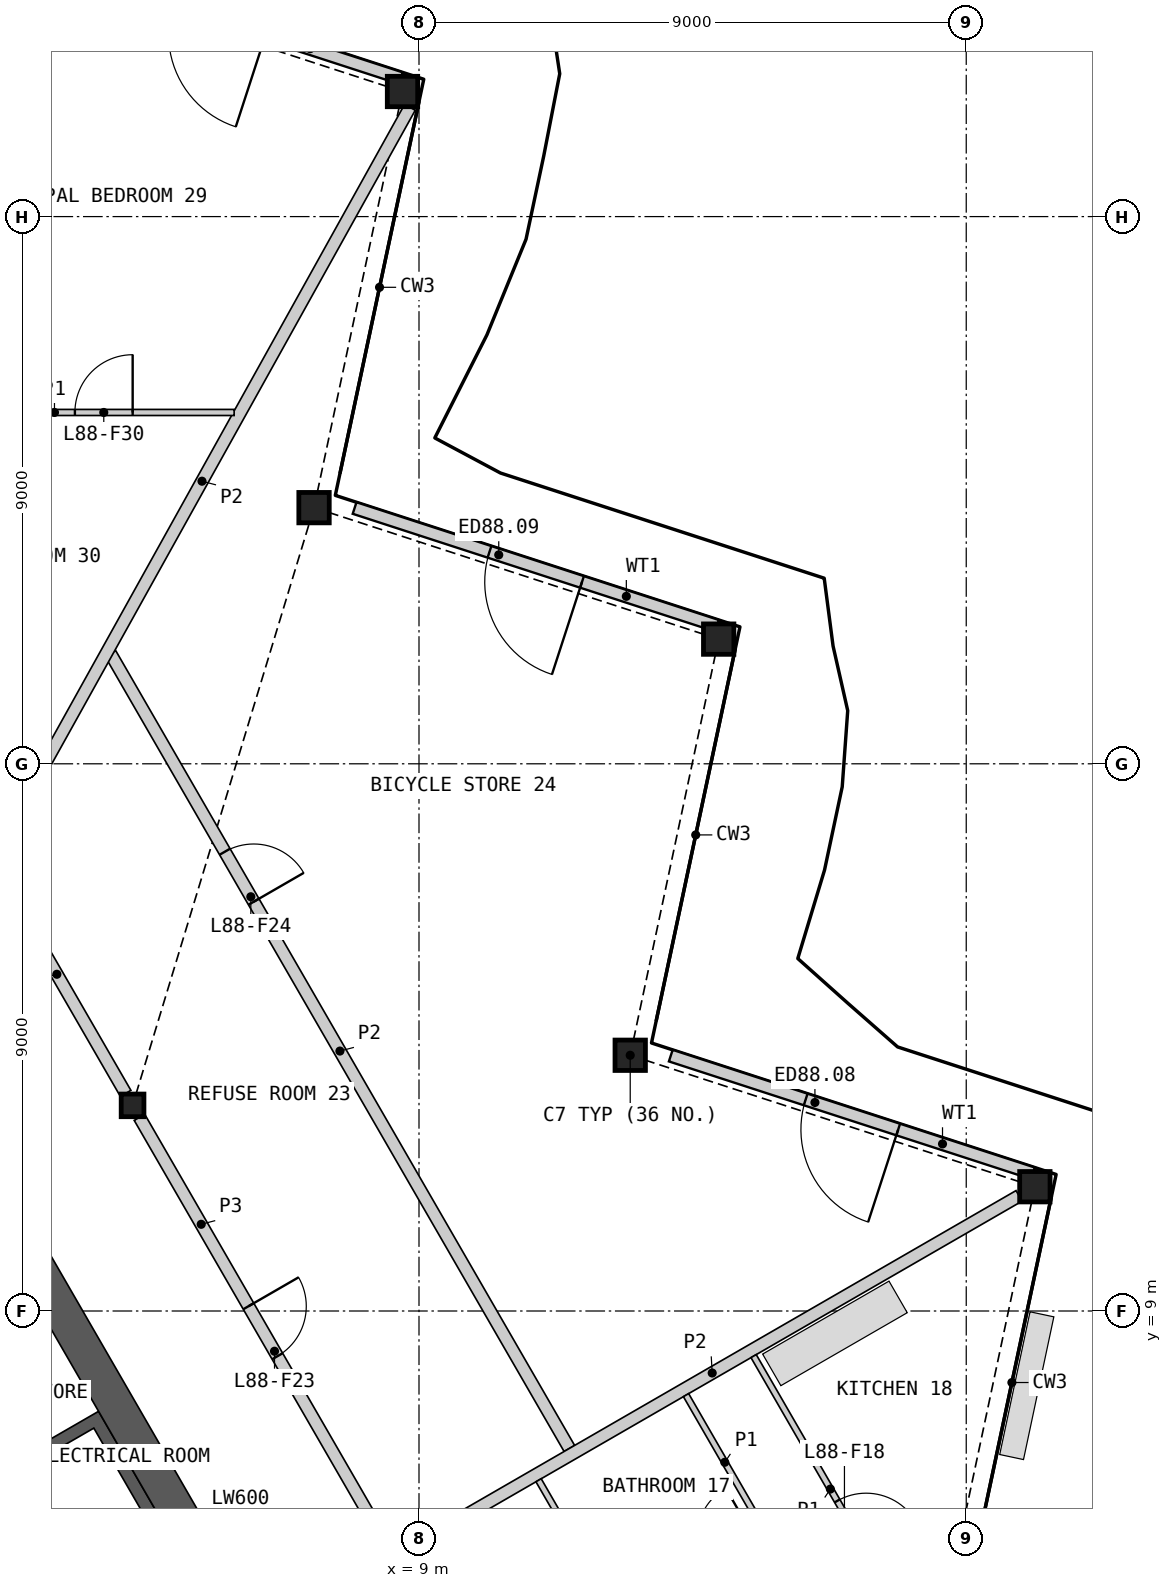
"""IFC4 building model, lengths in metres.
Left out: names, types, materials, properties, quantities, classifications, styles, units other than length and angle.
Written with IfcOpenShell. Run it as: python <this file> out.ifc"""

import sys

from ifc_helpers import new_model, si_unit, direction, frame, frame_2d, origin, origin_2d, place, context, subcontext, project, spatial, polyline, rectangle, hollow_rectangle, i_section, outline, extrude, element, fill, save


model = new_model("IFC4")
c1 = context("Model", 3, precision=1e-05, world=origin(), true_north=direction((0.0, 1.0)))
c2 = subcontext(c1, "Body", "Model", "MODEL_VIEW")
j1 = project(units=[si_unit("LENGTHUNIT", "METRE"), si_unit("PLANEANGLEUNIT", "RADIAN")], contexts=[c1])
p1 = place(None, origin())
s1 = spatial("IfcSite", under=j1, at=p1, CompositionType="ELEMENT")
p2 = place(p1, origin())
s2 = spatial("IfcBuilding", under=s1, at=p2, CompositionType="ELEMENT")
p3 = place(p2, frame((0.0, 0.0, 388.2)))
s3 = spatial("IfcBuildingStorey", under=s2, at=p3, CompositionType="ELEMENT", Elevation=388.2)
for number, where, z_axis, x_axis in (
    (1, (19.129, 11.044, 0.0), (0.0, 0.0, 1.0), (1.0, 0.0, 0.0)),
    (2, (12.474, 13.206, 0.0), (0.0, 0.0, 1.0), (1.0, 0.0, 0.0)),
    (3, (13.929, 20.051, 0.0), (0.0, 0.0, 1.0), (1.0, 0.0, 0.0)),
    (4, (7.274, 22.213, 0.0), (0.0, 0.0, 1.0), (1.0, 0.0, 0.0)),
    (5, (8.729, 29.057, 0.0), (0.0, 0.0, 1.0), (1.0, 0.0, 0.0)),
):
    element("IfcColumn", number, at=place(p3, frame(where, z_axis=z_axis, x_axis=x_axis)), inside=s3, PredefinedType="COLUMN", context=c2, shape_type="SweptSolid", body=[
        extrude(hollow_rectangle(XDim=0.5, YDim=0.5, WallThickness=0.03, at=origin_2d()), origin(), (0.0, 0.0, 1.0), 3.4),
    ])
p4 = place(p3, frame((4.289, 12.382, 0.0), z_axis=(0.0, 0.0, 1.0), x_axis=(1.0, 0.0, 0.0)))
e6 = element("IfcColumn", 6, at=p4, inside=s3, PredefinedType="COLUMN", context=c2, shape_type="SweptSolid", body=[
    extrude(i_section(OverallWidth=0.374, OverallDepth=0.372, WebThickness=0.016, FlangeThickness=0.026, at=origin_2d()), origin(), (0.0, 0.0, 1.0), 3.4),
])
p5 = place(p3, frame((19.099, 11.264, 0.0), z_axis=(0.0, 0.0, 1.0), x_axis=(-0.951056402988, 0.3090173431, 0.0)))
e7 = element("IfcWall", 7, at=p5, inside=s3, PredefinedType="SOLIDWALL", context=c2, shape_type="SweptSolid", body=[
    extrude(rectangle(XDim=6.265, YDim=0.2, at=frame_2d((3.133, 0.0))), origin(), (0.0, 0.0, 1.0), 2.634),
])
p6 = place(p5, frame((2.333, 0.0, 0.0)))
e8 = element("IfcOpeningElement", 8, at=p6, cuts=e7, PredefinedType="OPENING", context=c2, shape_type="SweptSolid", body=[
    extrude(rectangle(XDim=1.6, YDim=2.25, at=frame_2d((0.8, 1.125))), frame((0.0, 0.11, 0.0), z_axis=(0.0, -1.0, 0.0), x_axis=(1.0, 0.0, 0.0)), (0.0, 0.0, 1.0), 0.22),
])
p7 = place(p3, frame((13.899, 20.271, 0.0), z_axis=(0.0, 0.0, 1.0), x_axis=(-0.951056402988, 0.3090173431, 0.0)))
e9 = element("IfcWall", 9, at=p7, inside=s3, PredefinedType="SOLIDWALL", context=c2, shape_type="SweptSolid", body=[
    extrude(rectangle(XDim=6.265, YDim=0.2, at=frame_2d((3.133, 0.0))), origin(), (0.0, 0.0, 1.0), 2.634),
])
p8 = place(p7, frame((2.333, 0.0, 0.0)))
e10 = element("IfcOpeningElement", 10, at=p8, cuts=e9, PredefinedType="OPENING", context=c2, shape_type="SweptSolid", body=[
    extrude(rectangle(XDim=1.6, YDim=2.25, at=frame_2d((0.8, 1.125))), frame((0.0, 0.11, 0.0), z_axis=(0.0, -1.0, 0.0), x_axis=(1.0, 0.0, 0.0)), (0.0, 0.0, 1.0), 0.22),
])
p9 = place(p3, frame((8.699, 29.277, 0.0), z_axis=(0.0, 0.0, 1.0), x_axis=(-0.951048671744, 0.309041136379, 0.0)))
e11 = element("IfcWall", 11, at=p9, inside=s3, PredefinedType="SOLIDWALL", context=c2, shape_type="SweptSolid", body=[
    extrude(rectangle(XDim=6.265, YDim=0.2, at=frame_2d((3.133, 0.0))), origin(), (0.0, 0.0, 1.0), 2.634),
])
p10 = place(p9, frame((2.333, 0.0, 0.0)))
e12 = element("IfcOpeningElement", 12, at=p10, cuts=e11, PredefinedType="OPENING", context=c2, shape_type="SweptSolid", body=[
    extrude(rectangle(XDim=1.6, YDim=2.25, at=frame_2d((0.8, 1.125))), frame((0.0, 0.11, 0.0), z_axis=(0.0, -1.0, 0.0), x_axis=(1.0, 0.0, 0.0)), (0.0, 0.0, 1.0), 0.22),
])
p11 = place(p3, origin())
e13 = element("IfcWall", 13, at=p11, inside=s3, PredefinedType="SHEAR", context=c2, shape_type="SweptSolid", body=[
    extrude(outline(polyline([(1.561, 6.097), (3.731, 7.35), (8.231, -0.444), (6.061, -1.697), (5.96, -1.524), (7.952, -0.374), (6.952, 1.358), (4.96, 0.208), (4.861, 0.381), (6.852, 1.531), (5.852, 3.263), (3.861, 2.113), (3.76, 2.287), (5.752, 3.437), (4.752, 5.169), (2.76, 4.019), (2.66, 4.192), (4.652, 5.342), (3.652, 7.074), (1.66, 5.924), (1.561, 6.097)])), origin(), (0.0, 0.0, 1.0), 3.1),
])
p12 = place(p3, frame((5.817, -1.476, 0.0), z_axis=(0.0, 0.0, 1.0), x_axis=(-0.500002616675, 0.866023893041, 0.0)))
e14 = element("IfcWall", 14, at=p12, inside=s3, PredefinedType="SOLIDWALL", context=c2, shape_type="SweptSolid", body=[
    extrude(rectangle(XDim=8.373, YDim=0.2, at=frame_2d((4.187, 0.0))), origin(), (0.0, 0.0, 1.0), 3.1),
])
p13 = place(p12, frame((0.337, 0.0, 0.0)))
e15 = element("IfcOpeningElement", 15, at=p13, cuts=e14, PredefinedType="OPENING", context=c2, shape_type="SweptSolid", body=[
    extrude(rectangle(XDim=1.1, YDim=2.1, at=frame_2d((0.55, 1.05))), frame((0.0, 0.11, 0.0), z_axis=(0.0, -1.0, 0.0), x_axis=(1.0, 0.0, 0.0)), (0.0, 0.0, 1.0), 0.22),
])
p14 = place(p12, frame((2.537, 0.0, 0.0)))
e16 = element("IfcOpeningElement", 16, at=p14, cuts=e14, PredefinedType="OPENING", context=c2, shape_type="SweptSolid", body=[
    extrude(rectangle(XDim=1.1, YDim=2.1, at=frame_2d((0.55, 1.05))), frame((0.0, 0.11, 0.0), z_axis=(0.0, -1.0, 0.0), x_axis=(1.0, 0.0, 0.0)), (0.0, 0.0, 1.0), 0.22),
])
p15 = place(p12, frame((4.737, 0.0, 0.0)))
e17 = element("IfcOpeningElement", 17, at=p15, cuts=e14, PredefinedType="OPENING", context=c2, shape_type="SweptSolid", body=[
    extrude(rectangle(XDim=1.1, YDim=2.1, at=frame_2d((0.55, 1.05))), frame((0.0, 0.11, 0.0), z_axis=(0.0, -1.0, 0.0), x_axis=(1.0, 0.0, 0.0)), (0.0, 0.0, 1.0), 0.22),
])
p16 = place(p12, frame((7.037, 0.0, 0.0)))
e18 = element("IfcOpeningElement", 18, at=p16, cuts=e14, PredefinedType="OPENING", context=c2, shape_type="SweptSolid", body=[
    extrude(rectangle(XDim=0.9, YDim=2.1, at=frame_2d((0.45, 1.05))), frame((0.0, 0.11, 0.0), z_axis=(0.0, -1.0, 0.0), x_axis=(1.0, 0.0, 0.0)), (0.0, 0.0, 1.0), 0.22),
])
p17 = place(p3, frame((8.841, -0.902, 0.0), z_axis=(0.0, 0.0, 1.0), x_axis=(-0.499995618375, 0.866027933502, 0.0)))
e19 = element("IfcWall", 19, at=p17, inside=s3, PredefinedType="SHEAR", context=c2, shape_type="SweptSolid", body=[
    extrude(rectangle(XDim=14.571, YDim=0.6, at=frame_2d((7.285, 0.0))), origin(), (0.0, 0.0, 1.0), 3.1),
])
p18 = place(p3, frame((4.403, 12.185, 0.0), z_axis=(0.0, 0.0, 1.0), x_axis=(0.499992155518, -0.866029932751, 0.0)))
e20 = element("IfcWall", 20, at=p18, inside=s3, PredefinedType="PARTITIONING", context=c2, shape_type="SweptSolid", body=[
    extrude(rectangle(XDim=8.123, YDim=0.2, at=frame_2d((4.062, 0.0))), origin(), (0.0, 0.0, 1.0), 3.1),
])
p19 = place(p18, frame((3.587, 0.0, 0.0)))
e21 = element("IfcOpeningElement", 21, at=p19, cuts=e20, PredefinedType="OPENING", context=c2, shape_type="SweptSolid", body=[
    extrude(rectangle(XDim=0.95, YDim=2.1, at=frame_2d((0.475, 1.05))), frame((0.0, 0.11, 0.0), z_axis=(0.0, -1.0, 0.0), x_axis=(1.0, 0.0, 0.0)), (0.0, 0.0, 1.0), 0.22),
])
p20 = place(p3, frame((1.913, 16.498, 0.0), z_axis=(0.0, 0.0, 1.0), x_axis=(0.499974648164, -0.866040040179, 0.0)))
e22 = element("IfcWall", 22, at=p20, inside=s3, PredefinedType="PARTITIONING", context=c2, shape_type="SweptSolid", body=[
    extrude(rectangle(XDim=4.525, YDim=0.2, at=frame_2d((2.263, 0.0))), origin(), (0.0, 0.0, 1.0), 3.1),
])
p21 = place(p3, frame((3.926, 19.811, 0.0), z_axis=(0.0, 0.0, 1.0), x_axis=(0.500001082559, -0.866024778768, 0.0)))
e23 = element("IfcWall", 23, at=p21, inside=s3, PredefinedType="PARTITIONING", context=c2, shape_type="SweptSolid", body=[
    extrude(rectangle(XDim=15.094, YDim=0.2, at=frame_2d((7.547, 0.0))), origin(), (0.0, 0.0, 1.0), 2.33),
])
p22 = place(p21, frame((3.761, 0.0, 0.0)))
e24 = element("IfcOpeningElement", 24, at=p22, cuts=e23, PredefinedType="OPENING", context=c2, shape_type="SweptSolid", body=[
    extrude(rectangle(XDim=0.95, YDim=2.1, at=frame_2d((0.475, 1.05))), frame((0.0, 0.11, 0.0), z_axis=(0.0, -1.0, 0.0), x_axis=(1.0, 0.0, 0.0)), (0.0, 0.0, 1.0), 0.22),
])
p23 = place(p3, frame((2.012, 16.498, 0.0), z_axis=(0.0, 0.0, 1.0), x_axis=(0.485991996179, 0.873963259897, 0.0)))
e25 = element("IfcWall", 25, at=p23, inside=s3, PredefinedType="PARTITIONING", context=c2, shape_type="SweptSolid", body=[
    extrude(rectangle(XDim=14.073, YDim=0.2, at=frame_2d((7.036, 0.0))), origin(), (0.0, 0.0, 1.0), 2.33),
])
p24 = place(p3, frame((8.775, 5.066, 0.0), z_axis=(0.0, 0.0, 1.0), x_axis=(0.866023724155, 0.500002909193, 0.0)))
e26 = element("IfcWall", 26, at=p24, inside=s3, PredefinedType="PARTITIONING", context=c2, shape_type="SweptSolid", body=[
    extrude(rectangle(XDim=11.655, YDim=0.2, at=frame_2d((5.827, 0.0))), origin(), (0.0, 0.0, 1.0), 2.33),
])
p25 = place(p3, frame((0.05, 23.778, 0.0), z_axis=(0.0, 0.0, 1.0), x_axis=(1.0, 0.0, 0.0)))
e27 = element("IfcWall", 27, at=p25, inside=s3, PredefinedType="PARTITIONING", context=c2, shape_type="SweptSolid", body=[
    extrude(rectangle(XDim=5.91, YDim=0.1, at=frame_2d((2.955, 0.0))), origin(), (0.0, 0.0, 1.0), 2.33),
])
p26 = place(p25, frame((3.291, 0.0, 0.0)))
e28 = element("IfcOpeningElement", 28, at=p26, cuts=e27, PredefinedType="OPENING", context=c2, shape_type="SweptSolid", body=[
    extrude(rectangle(XDim=0.95, YDim=2.1, at=frame_2d((0.475, 1.05))), frame((0.0, 0.06, 0.0), z_axis=(0.0, -1.0, 0.0), x_axis=(1.0, 0.0, 0.0)), (0.0, 0.0, 1.0), 0.12),
])
p27 = place(p3, frame((14.503, 8.258, 0.0), z_axis=(0.0, 0.0, 1.0), x_axis=(0.500012591307, -0.866018134068, 0.0)))
e29 = element("IfcWall", 29, at=p27, inside=s3, PredefinedType="PARTITIONING", context=c2, shape_type="SweptSolid", body=[
    extrude(rectangle(XDim=5.05, YDim=0.1, at=frame_2d((2.525, 0.0))), origin(), (0.0, 0.0, 1.0), 2.33),
])
p28 = place(p27, frame((2.75, 0.0, 0.0)))
e30 = element("IfcOpeningElement", 30, at=p28, cuts=e29, PredefinedType="OPENING", context=c2, shape_type="SweptSolid", body=[
    extrude(rectangle(XDim=0.95, YDim=2.1, at=frame_2d((0.475, 1.05))), frame((0.0, 0.06, 0.0), z_axis=(0.0, -1.0, 0.0), x_axis=(1.0, 0.0, 0.0)), (0.0, 0.0, 1.0), 0.12),
])
for number, where, z_axis, x_axis in (
    (31, (10.967, 6.216, 0.0), (0.0, 0.0, 1.0), (0.5, -0.866, 0.0)),
    (32, (13.392, 7.616, 0.0), (0.0, 0.0, 1.0), (0.5, -0.866, 0.0)),
):
    element("IfcWall", number, at=place(p3, frame(where, z_axis=z_axis, x_axis=x_axis)), inside=s3, PredefinedType="PARTITIONING", context=c2, shape_type="SweptSolid", body=[
        extrude(rectangle(XDim=2.55, YDim=0.1, at=frame_2d((1.275, 0.0))), origin(), (0.0, 0.0, 1.0), 2.33),
    ])
p29 = place(p6, origin())
e33 = element("IfcDoor", 33, at=p29, inside=s3, OperationType="DOUBLE_DOOR_SINGLE_SWING", PredefinedType="DOOR", context=c2, shape_type="SweptSolid", body=[
    extrude(rectangle(XDim=1.6, YDim=2.25, at=frame_2d((0.8, 1.125))), frame((0.0, 0.025, 0.0), z_axis=(0.0, -1.0, 0.0), x_axis=(1.0, 0.0, 0.0)), (0.0, 0.0, 1.0), 0.05),
])
fill(e8, e33)
p30 = place(p8, origin())
e34 = element("IfcDoor", 34, at=p30, inside=s3, OperationType="DOUBLE_DOOR_SINGLE_SWING", PredefinedType="DOOR", context=c2, shape_type="SweptSolid", body=[
    extrude(rectangle(XDim=1.6, YDim=2.25, at=frame_2d((0.8, 1.125))), frame((0.0, 0.025, 0.0), z_axis=(0.0, -1.0, 0.0), x_axis=(1.0, 0.0, 0.0)), (0.0, 0.0, 1.0), 0.05),
])
fill(e10, e34)
p31 = place(p28, origin())
e35 = element("IfcDoor", 35, at=p31, inside=s3, OperationType="SINGLE_SWING_RIGHT", PredefinedType="DOOR", context=c2, shape_type="SweptSolid", body=[
    extrude(rectangle(XDim=0.95, YDim=2.1, at=frame_2d((0.475, 1.05))), frame((0.0, 0.025, 0.0), z_axis=(0.0, -1.0, 0.0), x_axis=(1.0, 0.0, 0.0)), (0.0, 0.0, 1.0), 0.05),
])
fill(e30, e35)
p32 = place(p19, origin())
e36 = element("IfcDoor", 36, at=p32, inside=s3, OperationType="SINGLE_SWING_LEFT", PredefinedType="DOOR", context=c2, shape_type="SweptSolid", body=[
    extrude(rectangle(XDim=0.95, YDim=2.1, at=frame_2d((0.475, 1.05))), frame((0.0, 0.025, 0.0), z_axis=(0.0, -1.0, 0.0), x_axis=(1.0, 0.0, 0.0)), (0.0, 0.0, 1.0), 0.05),
])
fill(e21, e36)
p33 = place(p22, origin())
e37 = element("IfcDoor", 37, at=p33, inside=s3, OperationType="SINGLE_SWING_RIGHT", PredefinedType="DOOR", context=c2, shape_type="SweptSolid", body=[
    extrude(rectangle(XDim=0.95, YDim=2.1, at=frame_2d((0.475, 1.05))), frame((0.0, 0.025, 0.0), z_axis=(0.0, -1.0, 0.0), x_axis=(1.0, 0.0, 0.0)), (0.0, 0.0, 1.0), 0.05),
])
fill(e24, e37)
p34 = place(p26, origin())
e38 = element("IfcDoor", 38, at=p34, inside=s3, OperationType="SINGLE_SWING_RIGHT", PredefinedType="DOOR", context=c2, shape_type="SweptSolid", body=[
    extrude(rectangle(XDim=0.95, YDim=2.1, at=frame_2d((0.475, 1.05))), frame((0.0, 0.025, 0.0), z_axis=(0.0, -1.0, 0.0), x_axis=(1.0, 0.0, 0.0)), (0.0, 0.0, 1.0), 0.05),
])
fill(e28, e38)
save(model, sys.argv[1])
